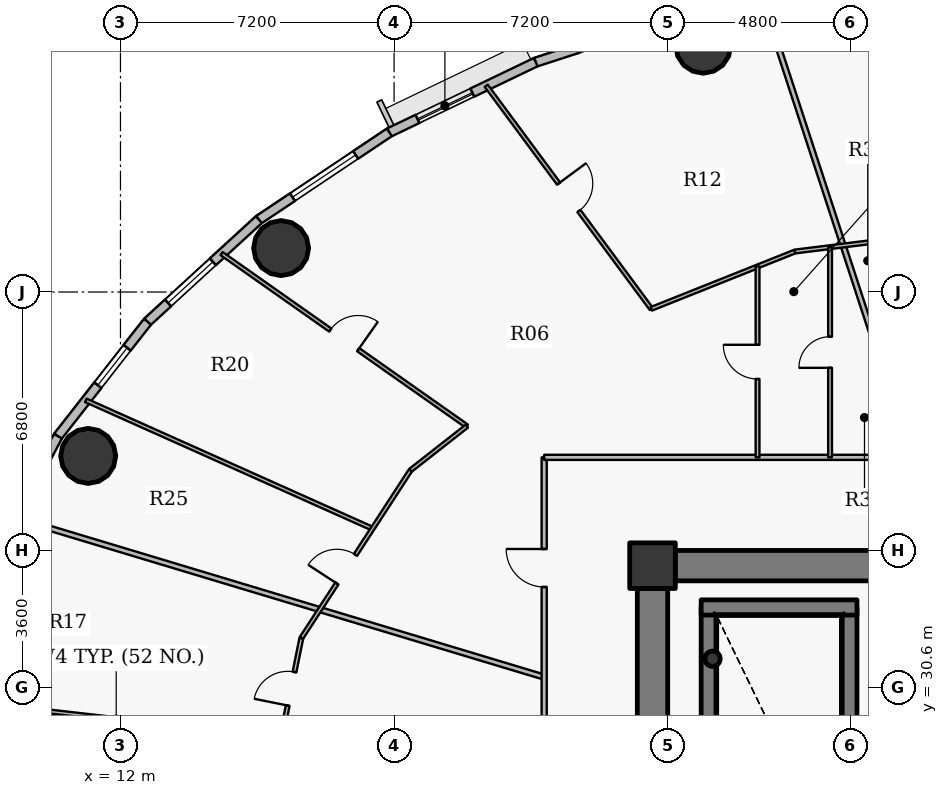
"""IFC4 building model, lengths in metres.
Left out: names, types, materials, properties, quantities, classifications, styles, units other than length and angle.
Written with IfcOpenShell. Run it as: python <this file> out.ifc"""

import sys

from ifc_helpers import new_model, si_unit, direction, frame, frame_2d, origin, origin_2d, place, context, subcontext, project, spatial, rectangle, hollow_circle, extrude, source, transform, mapped, element, fill, save


model = new_model("IFC4")
c1 = context("Model", 3, precision=1e-05, world=origin(), true_north=direction((0.0, 1.0)))
c2 = subcontext(c1, "Body", "Model", "MODEL_VIEW")
j1 = project(units=[si_unit("LENGTHUNIT", "METRE"), si_unit("PLANEANGLEUNIT", "RADIAN")], contexts=[c1])
p1 = place(None, origin())
s1 = spatial("IfcSite", under=j1, at=p1, CompositionType="ELEMENT")
p2 = place(p1, origin())
s2 = spatial("IfcBuilding", under=s1, at=p2, CompositionType="ELEMENT")
p3 = place(p2, frame((0.0, 0.0, 108.45)))
s3 = spatial("IfcBuildingStorey", under=s2, at=p3, CompositionType="ELEMENT", Elevation=108.45)
p4 = place(p3, frame((26.0, 33.8, 0.0), z_axis=(0.0, 0.0, 1.0), x_axis=(1.0, 0.0, 0.0)))
e1 = element("IfcColumn", 1, at=p4, inside=s3, PredefinedType="COLUMN", context=c2, shape_type="SweptSolid", body=[
    extrude(rectangle(XDim=1.2, YDim=1.2, at=origin_2d()), origin(), (0.0, 0.0, 1.0), 3.75),
])
p5 = place(p3, frame((27.48, 24.1, 0.0), z_axis=(0.0, 0.0, 1.0), x_axis=(0.0, 1.0, 0.0)))
e2 = element("IfcWall", 2, at=p5, inside=s3, PredefinedType="SHEAR", context=c2, shape_type="SweptSolid", body=[
    extrude(rectangle(XDim=8.6, YDim=0.4, at=frame_2d((4.3, 0.0))), origin(), (0.0, 0.0, 1.0), 3.75),
])
p6 = place(p3, frame((31.18, 27.8, 0.0), z_axis=(0.0, 0.0, 1.0), x_axis=(0.0, 1.0, 0.0)))
e3 = element("IfcWall", 3, at=p6, inside=s3, PredefinedType="SHEAR", context=c2, shape_type="SweptSolid", body=[
    extrude(rectangle(XDim=4.9, YDim=0.4, at=frame_2d((2.45, 0.0))), origin(), (0.0, 0.0, 1.0), 3.75),
])
p7 = place(p3, frame((27.28, 32.7, 0.0), z_axis=(0.0, 0.0, 1.0), x_axis=(1.0, 0.0, 0.0)))
e4 = element("IfcWall", 4, at=p7, inside=s3, PredefinedType="SHEAR", context=c2, shape_type="SweptSolid", body=[
    extrude(rectangle(XDim=4.1, YDim=0.4, at=frame_2d((2.05, 0.0))), origin(), (0.0, 0.0, 1.0), 3.75),
])
p8 = place(p3, frame((27.58, 31.35, 0.0), z_axis=(0.0, 0.0, 1.0), x_axis=(1.0, 0.0, 0.0)))
e5 = element("IfcColumn", 5, at=p8, inside=s3, PredefinedType="COLUMN", context=c2, shape_type="SweptSolid", body=[
    extrude(hollow_circle(Radius=0.203, WallThickness=0.016, at=origin_2d()), origin(), (0.0, 0.0, 1.0), 3.75),
])
p9 = place(p3, frame((26.6, 33.8, 0.0), z_axis=(0.0, 0.0, 1.0), x_axis=(1.0, 0.0, 0.0)))
e6 = element("IfcWall", 6, at=p9, inside=s3, PredefinedType="SHEAR", context=c2, shape_type="SweptSolid", body=[
    extrude(rectangle(XDim=18.8, YDim=0.8, at=frame_2d((9.4, 0.0))), origin(), (0.0, 0.0, 1.0), 2.95),
])
p10 = place(p3, frame((26.0, 20.8, 0.0), z_axis=(0.0, 0.0, 1.0), x_axis=(0.0, 1.0, 0.0)))
e7 = element("IfcWall", 7, at=p10, inside=s3, PredefinedType="SHEAR", context=c2, shape_type="SweptSolid", body=[
    extrude(rectangle(XDim=12.4, YDim=0.8, at=frame_2d((6.2, 0.0))), origin(), (0.0, 0.0, 1.0), 2.95),
])
p11 = place(p10, frame((5.79, 0.0, 0.0)))
e8 = element("IfcOpeningElement", 8, at=p11, cuts=e7, PredefinedType="OPENING", context=c2, shape_type="SweptSolid", body=[
    extrude(rectangle(XDim=0.82, YDim=2.1, at=origin_2d()), frame((0.41, 0.41, 1.05), z_axis=(0.0, -1.0, 0.0), x_axis=(1.0, 0.0, 0.0)), (0.0, 0.0, 1.0), 0.82),
])
for number, where, z_axis, x_axis in (
    (9, (27.334, 47.481, 0.0), (0.0, 0.0, 1.0), (1.0, 0.0, 0.0)),
    (10, (16.227, 42.156, 0.0), (0.0, 0.0, 1.0), (1.0, 0.0, 0.0)),
    (11, (11.151, 36.688, 0.0), (0.0, 0.0, 1.0), (1.0, 0.0, 0.0)),
):
    element("IfcColumn", number, at=place(p3, frame(where, z_axis=z_axis, x_axis=x_axis)), inside=s3, PredefinedType="COLUMN", context=c2, shape_type="SweptSolid", body=[
        extrude(hollow_circle(Radius=0.725, WallThickness=0.042, at=origin_2d()), origin(), (0.0, 0.0, 1.0), 3.75),
    ])
p12 = place(p3, frame((22.926, 47.047, 0.0), z_axis=(0.0, 0.0, 1.0), x_axis=(0.951211346073, 0.308540070495, 0.0)))
e12 = element("IfcWall", 12, at=p12, inside=s3, PredefinedType="SOLIDWALL", context=c2, shape_type="SweptSolid", body=[
    extrude(rectangle(XDim=4.388, YDim=0.24, at=frame_2d((2.194, 0.0))), origin(), (0.0, 0.0, 1.0), 3.5),
])
p13 = place(p12, frame((1.194, 0.0, 0.9)))
e13 = element("IfcOpeningElement", 13, at=p13, cuts=e12, PredefinedType="OPENING", context=c2, shape_type="SweptSolid", body=[
    extrude(rectangle(XDim=2.0, YDim=1.75, at=origin_2d()), frame((1.0, 0.13, 0.875), z_axis=(0.0, -1.0, 0.0), x_axis=(1.0, 0.0, 0.0)), (0.0, 0.0, 1.0), 0.26),
])
p14 = place(p3, frame((19.075, 45.199, 0.0), z_axis=(0.0, 0.0, 1.0), x_axis=(0.901589935876, 0.432591709962, 0.0)))
e14 = element("IfcWall", 14, at=p14, inside=s3, PredefinedType="SOLIDWALL", context=c2, shape_type="SweptSolid", body=[
    extrude(rectangle(XDim=4.272, YDim=0.24, at=frame_2d((2.136, 0.0))), origin(), (0.0, 0.0, 1.0), 3.5),
])
p15 = place(p14, frame((0.822, 0.0, 0.9)))
e15 = element("IfcOpeningElement", 15, at=p15, cuts=e14, PredefinedType="OPENING", context=c2, shape_type="SweptSolid", body=[
    extrude(rectangle(XDim=1.6, YDim=1.75, at=origin_2d()), frame((0.8, 0.13, 0.875), z_axis=(0.0, -1.0, 0.0), x_axis=(1.0, 0.0, 0.0)), (0.0, 0.0, 1.0), 0.26),
])
p16 = place(p3, frame((15.642, 42.903, 0.0), z_axis=(0.0, 0.0, 1.0), x_axis=(0.831221811447, 0.555940914284, 0.0)))
e16 = element("IfcWall", 16, at=p16, inside=s3, PredefinedType="SOLIDWALL", context=c2, shape_type="SweptSolid", body=[
    extrude(rectangle(XDim=4.13, YDim=0.24, at=frame_2d((2.065, 0.0))), origin(), (0.0, 0.0, 1.0), 3.5),
])
p17 = place(p16, frame((1.065, 0.0, 0.9)))
e17 = element("IfcOpeningElement", 17, at=p17, cuts=e16, PredefinedType="OPENING", context=c2, shape_type="SweptSolid", body=[
    extrude(rectangle(XDim=2.0, YDim=1.75, at=origin_2d()), frame((1.0, 0.13, 0.875), z_axis=(0.0, -1.0, 0.0), x_axis=(1.0, 0.0, 0.0)), (0.0, 0.0, 1.0), 0.26),
])
p18 = place(p3, frame((12.711, 40.217, 0.0), z_axis=(0.0, 0.0, 1.0), x_axis=(0.737113356241, 0.675769117414, 0.0)))
e18 = element("IfcWall", 18, at=p18, inside=s3, PredefinedType="SOLIDWALL", context=c2, shape_type="SweptSolid", body=[
    extrude(rectangle(XDim=3.976, YDim=0.24, at=frame_2d((1.988, 0.0))), origin(), (0.0, 0.0, 1.0), 3.5),
])
p19 = place(p18, frame((0.734, 0.0, 0.9)))
e19 = element("IfcOpeningElement", 19, at=p19, cuts=e18, PredefinedType="OPENING", context=c2, shape_type="SweptSolid", body=[
    extrude(rectangle(XDim=1.6, YDim=1.75, at=origin_2d()), frame((0.8, 0.13, 0.875), z_axis=(0.0, -1.0, 0.0), x_axis=(1.0, 0.0, 0.0)), (0.0, 0.0, 1.0), 0.26),
])
p20 = place(p3, frame((10.355, 37.206, 0.0), z_axis=(0.0, 0.0, 1.0), x_axis=(0.616272103517, 0.787533297345, 0.0)))
e20 = element("IfcWall", 20, at=p20, inside=s3, PredefinedType="SOLIDWALL", context=c2, shape_type="SweptSolid", body=[
    extrude(rectangle(XDim=3.823, YDim=0.24, at=frame_2d((1.912, 0.0))), origin(), (0.0, 0.0, 1.0), 3.5),
])
p21 = place(p20, frame((1.705, 0.0, 0.9)))
e21 = element("IfcOpeningElement", 21, at=p21, cuts=e20, PredefinedType="OPENING", context=c2, shape_type="SweptSolid", body=[
    extrude(rectangle(XDim=1.25, YDim=1.65, at=origin_2d()), frame((0.625, 0.13, 0.825), z_axis=(0.0, -1.0, 0.0), x_axis=(1.0, 0.0, 0.0)), (0.0, 0.0, 1.0), 0.26),
])
p22 = place(p3, frame((8.63, 33.945, 0.0), z_axis=(0.0, 0.0, 1.0), x_axis=(0.467614004126, 0.883932770716, 0.0)))
e22 = element("IfcWall", 22, at=p22, inside=s3, PredefinedType="SOLIDWALL", context=c2, shape_type="SweptSolid", body=[
    extrude(rectangle(XDim=3.689, YDim=0.24, at=frame_2d((1.844, 0.0))), origin(), (0.0, 0.0, 1.0), 3.5),
])
p23 = place(p3, frame((7.548, 30.259, 0.0), z_axis=(0.0, 0.0, 1.0), x_axis=(0.993502465776, -0.11381059044, 0.0)))
e23 = element("IfcWall", 23, at=p23, inside=s3, PredefinedType="PARTITIONING", context=c2, shape_type="SweptSolid", body=[
    extrude(rectangle(XDim=8.737, YDim=0.1, at=frame_2d((4.369, 0.0))), origin(), (0.0, 0.0, 1.0), 2.935),
])
p24 = place(p3, frame((9.215, 35.062, 0.0), z_axis=(0.0, 0.0, 1.0), x_axis=(0.957569176287, -0.288203526393, 0.0)))
e24 = element("IfcWall", 24, at=p24, inside=s3, PredefinedType="PARTITIONING", context=c2, shape_type="SweptSolid", body=[
    extrude(rectangle(XDim=14.552, YDim=0.135, at=frame_2d((7.276, 0.0))), origin(), (0.0, 0.0, 1.0), 2.935),
])
p25 = place(p3, frame((11.087, 38.15, 0.0), z_axis=(0.0, 0.0, 1.0), x_axis=(0.912756243594, -0.408504638627, 0.0)))
e25 = element("IfcWall", 25, at=p25, inside=s3, PredefinedType="PARTITIONING", context=c2, shape_type="SweptSolid", body=[
    extrude(rectangle(XDim=8.267, YDim=0.1, at=frame_2d((4.133, 0.0))), origin(), (0.0, 0.0, 1.0), 2.935),
])
p26 = place(p3, frame((14.661, 42.011, 0.0), z_axis=(0.0, 0.0, 1.0), x_axis=(0.817899711196, -0.575360810645, 0.0)))
e26 = element("IfcWall", 26, at=p26, inside=s3, PredefinedType="PARTITIONING", context=c2, shape_type="SweptSolid", body=[
    extrude(rectangle(XDim=7.891, YDim=0.1, at=frame_2d((3.945, 0.0))), origin(), (0.0, 0.0, 1.0), 2.935),
])
p27 = place(p26, frame((3.495, 0.0, 0.0)))
e27 = element("IfcOpeningElement", 27, at=p27, cuts=e26, PredefinedType="OPENING", context=c2, shape_type="SweptSolid", body=[
    extrude(rectangle(XDim=0.9, YDim=2.1, at=origin_2d()), frame((0.45, 0.06, 1.05), z_axis=(0.0, -1.0, 0.0), x_axis=(1.0, 0.0, 0.0)), (0.0, 0.0, 1.0), 0.12),
])
p28 = place(p3, frame((15.77, 27.0, 0.0), z_axis=(0.0, 0.0, 1.0), x_axis=(0.19822142127, 0.980157267049, 0.0)))
e28 = element("IfcWall", 28, at=p28, inside=s3, PredefinedType="PARTITIONING", context=c2, shape_type="SweptSolid", body=[
    extrude(rectangle(XDim=4.994, YDim=0.1, at=frame_2d((2.497, 0.0))), origin(), (0.0, 0.0, 1.0), 2.935),
])
p29 = place(p28, frame((3.183, 0.0, 0.0)))
e29 = element("IfcOpeningElement", 29, at=p29, cuts=e28, PredefinedType="OPENING", context=c2, shape_type="SweptSolid", body=[
    extrude(rectangle(XDim=0.9, YDim=2.1, at=origin_2d()), frame((0.45, 0.06, 1.05), z_axis=(0.0, -1.0, 0.0), x_axis=(1.0, 0.0, 0.0)), (0.0, 0.0, 1.0), 0.12),
])
p30 = place(p28, frame((0.725, 0.0, 0.0)))
e30 = element("IfcOpeningElement", 30, at=p30, cuts=e28, PredefinedType="OPENING", context=c2, shape_type="SweptSolid", body=[
    extrude(rectangle(XDim=0.9, YDim=2.1, at=origin_2d()), frame((0.45, 0.06, 1.05), z_axis=(0.0, -1.0, 0.0), x_axis=(1.0, 0.0, 0.0)), (0.0, 0.0, 1.0), 0.12),
])
p31 = place(p3, frame((16.76, 31.895, 0.0), z_axis=(0.0, 0.0, 1.0), x_axis=(0.545405249109, 0.838172484781, 0.0)))
e31 = element("IfcWall", 31, at=p31, inside=s3, PredefinedType="PARTITIONING", context=c2, shape_type="SweptSolid", body=[
    extrude(rectangle(XDim=5.269, YDim=0.1, at=frame_2d((2.634, 0.0))), origin(), (0.0, 0.0, 1.0), 2.935),
])
p32 = place(p31, frame((1.713, 0.0, 0.0)))
e32 = element("IfcOpeningElement", 32, at=p32, cuts=e31, PredefinedType="OPENING", context=c2, shape_type="SweptSolid", body=[
    extrude(rectangle(XDim=0.9, YDim=2.1, at=origin_2d()), frame((0.45, 0.06, 1.05), z_axis=(0.0, -1.0, 0.0), x_axis=(1.0, 0.0, 0.0)), (0.0, 0.0, 1.0), 0.12),
])
p33 = place(p3, frame((19.634, 36.311, 0.0), z_axis=(0.0, 0.0, 1.0), x_axis=(0.787307829703, 0.616560119768, 0.0)))
e33 = element("IfcWall", 33, at=p33, inside=s3, PredefinedType="PARTITIONING", context=c2, shape_type="SweptSolid", body=[
    extrude(rectangle(XDim=1.882, YDim=0.1, at=frame_2d((0.941, 0.0))), origin(), (0.0, 0.0, 1.0), 3.5),
])
p34 = place(p3, frame((21.624, 46.428, 0.0), z_axis=(0.0, 0.0, 1.0), x_axis=(0.594804555611, -0.803870350631, 0.0)))
e34 = element("IfcWall", 34, at=p34, inside=s3, PredefinedType="PARTITIONING", context=c2, shape_type="SweptSolid", body=[
    extrude(rectangle(XDim=7.303, YDim=0.1, at=frame_2d((3.652, 0.0))), origin(), (0.0, 0.0, 1.0), 2.935),
])
p35 = place(p34, frame((3.202, 0.0, 0.0)))
e35 = element("IfcOpeningElement", 35, at=p35, cuts=e34, PredefinedType="OPENING", context=c2, shape_type="SweptSolid", body=[
    extrude(rectangle(XDim=0.9, YDim=2.1, at=origin_2d()), frame((0.45, 0.06, 1.05), z_axis=(0.0, -1.0, 0.0), x_axis=(1.0, 0.0, 0.0)), (0.0, 0.0, 1.0), 0.12),
])
p36 = place(p3, frame((23.15, 17.35, 0.0), z_axis=(0.0, 0.0, 1.0), x_axis=(0.0, 1.0, 0.0)))
e36 = element("IfcWall", 36, at=p36, inside=s3, PredefinedType="PARTITIONING", context=c2, shape_type="SweptSolid", body=[
    extrude(rectangle(XDim=19.3, YDim=0.135, at=frame_2d((9.65, 0.0))), origin(), (0.0, 0.0, 1.0), 2.935),
])
p37 = place(p36, frame((15.889, 0.0, 0.0)))
e37 = element("IfcOpeningElement", 37, at=p37, cuts=e36, PredefinedType="OPENING", context=c2, shape_type="SweptSolid", body=[
    extrude(rectangle(XDim=1.0, YDim=2.15, at=origin_2d()), frame((0.5, 0.078, 1.075), z_axis=(0.0, -1.0, 0.0), x_axis=(1.0, 0.0, 0.0)), (0.0, 0.0, 1.0), 0.155),
])
p38 = place(p36, frame((6.279, 0.0, 0.0)))
e38 = element("IfcOpeningElement", 38, at=p38, cuts=e36, PredefinedType="OPENING", context=c2, shape_type="SweptSolid", body=[
    extrude(rectangle(XDim=1.0, YDim=2.15, at=origin_2d()), frame((0.5, 0.078, 1.075), z_axis=(0.0, -1.0, 0.0), x_axis=(1.0, 0.0, 0.0)), (0.0, 0.0, 1.0), 0.155),
])
p39 = place(p3, frame((23.15, 36.65, 0.0), z_axis=(0.0, 0.0, 1.0), x_axis=(1.0, 0.0, 0.0)))
e39 = element("IfcWall", 39, at=p39, inside=s3, PredefinedType="PARTITIONING", context=c2, shape_type="SweptSolid", body=[
    extrude(rectangle(XDim=10.373, YDim=0.135, at=frame_2d((5.187, 0.0))), origin(), (0.0, 0.0, 1.0), 2.935),
])
p40 = place(p3, frame((25.968, 40.557, 0.0), z_axis=(0.0, 0.0, 1.0), x_axis=(0.928807252466, 0.37056320347, 0.0)))
e40 = element("IfcWall", 40, at=p40, inside=s3, PredefinedType="PARTITIONING", context=c2, shape_type="SweptSolid", body=[
    extrude(rectangle(XDim=4.07, YDim=0.1, at=frame_2d((2.035, 0.0))), origin(), (0.0, 0.0, 1.0), 2.935),
])
p41 = place(p3, frame((28.764, 36.65, 0.0), z_axis=(0.0, 0.0, 1.0), x_axis=(0.0, 1.0, 0.0)))
e41 = element("IfcWall", 41, at=p41, inside=s3, PredefinedType="PARTITIONING", context=c2, shape_type="SweptSolid", body=[
    extrude(rectangle(XDim=5.023, YDim=0.1, at=frame_2d((2.511, 0.0))), origin(), (0.0, 0.0, 1.0), 3.5),
])
p42 = place(p41, frame((2.062, 0.0, 0.0)))
e42 = element("IfcOpeningElement", 42, at=p42, cuts=e41, PredefinedType="OPENING", context=c2, shape_type="SweptSolid", body=[
    extrude(rectangle(XDim=0.9, YDim=2.1, at=origin_2d()), frame((0.45, 0.06, 1.05), z_axis=(0.0, -1.0, 0.0), x_axis=(1.0, 0.0, 0.0)), (0.0, 0.0, 1.0), 0.12),
])
p43 = place(p3, frame((28.883, 48.741, 0.0), z_axis=(0.0, 0.0, 1.0), x_axis=(0.311090320612, -0.95038035145, 0.0)))
e43 = element("IfcWall", 43, at=p43, inside=s3, PredefinedType="PARTITIONING", context=c2, shape_type="SweptSolid", body=[
    extrude(rectangle(XDim=12.671, YDim=0.135, at=frame_2d((6.335, 0.0))), origin(), (0.0, 0.0, 1.0), 2.935),
])
p44 = place(p3, frame((29.749, 42.066, 0.0), z_axis=(0.0, 0.0, 1.0), x_axis=(0.992395485088, 0.123090215599, 0.0)))
e44 = element("IfcWall", 44, at=p44, inside=s3, PredefinedType="PARTITIONING", context=c2, shape_type="SweptSolid", body=[
    extrude(rectangle(XDim=6.299, YDim=0.1, at=frame_2d((3.15, 0.0))), origin(), (0.0, 0.0, 1.0), 2.935),
])
p45 = place(p3, frame((30.673, 36.65, 0.0), z_axis=(0.0, 0.0, 1.0), x_axis=(0.0, 1.0, 0.0)))
e45 = element("IfcWall", 45, at=p45, inside=s3, PredefinedType="PARTITIONING", context=c2, shape_type="SweptSolid", body=[
    extrude(rectangle(XDim=5.53, YDim=0.1, at=frame_2d((2.765, 0.0))), origin(), (0.0, 0.0, 1.0), 2.935),
])
p46 = place(p45, frame((2.355, 0.0, 0.0)))
e46 = element("IfcOpeningElement", 46, at=p46, cuts=e45, PredefinedType="OPENING", context=c2, shape_type="SweptSolid", body=[
    extrude(rectangle(XDim=0.82, YDim=2.1, at=origin_2d()), frame((0.41, 0.06, 1.05), z_axis=(0.0, -1.0, 0.0), x_axis=(1.0, 0.0, 0.0)), (0.0, 0.0, 1.0), 0.12),
])
p47 = place(p3, frame((26.59, 34.2, 0.0), z_axis=(0.0, 0.0, 1.0), x_axis=(-1.0, 0.0, 0.0)))
e47 = element("IfcWall", 47, at=p47, inside=s3, PredefinedType="PARTITIONING", context=c2, shape_type="SweptSolid", body=[
    extrude(rectangle(XDim=0.99, YDim=0.135, at=frame_2d((0.495, 0.0))), origin(), (0.0, 0.0, 1.0), 2.935),
])
p48 = place(p3, frame((25.6, 33.893, 0.0), z_axis=(0.0, 0.0, 1.0), x_axis=(0.0, -1.0, 0.0)))
e48 = element("IfcWall", 48, at=p48, inside=s3, PredefinedType="PARTITIONING", context=c2, shape_type="SweptSolid", body=[
    extrude(rectangle(XDim=0.683, YDim=0.135, at=frame_2d((0.341, 0.0))), origin(), (0.0, 0.0, 1.0), 3.5),
])
m1 = source(origin(), c2, "Body", "SweptSolid", [
    extrude(rectangle(XDim=1.6, YDim=1.75, at=origin_2d()), frame((0.8, 0.03, 0.875), z_axis=(0.0, -1.0, 0.0), x_axis=(1.0, 0.0, 0.0)), (0.0, 0.0, 1.0), 0.06),
])
p49 = place(p15, origin())
e49 = element("IfcWindow", 49, at=p49, inside=s3, PartitioningType="DOUBLE_PANEL_VERTICAL", PredefinedType="WINDOW", context=c2, shape_type="MappedRepresentation", body=[
    mapped(m1, transform((0.0, 0.0, 0.0), x_axis=(1.0, 0.0, 0.0), y_axis=(0.0, 1.0, 0.0), z_axis=(0.0, 0.0, 1.0), scale=1.0)),
])
fill(e15, e49)
m2 = source(origin(), c2, "Body", "SweptSolid", [
    extrude(rectangle(XDim=2.0, YDim=1.75, at=origin_2d()), frame((1.0, 0.03, 0.875), z_axis=(0.0, -1.0, 0.0), x_axis=(1.0, 0.0, 0.0)), (0.0, 0.0, 1.0), 0.06),
])
p50 = place(p17, origin())
e50 = element("IfcWindow", 50, at=p50, inside=s3, PartitioningType="DOUBLE_PANEL_VERTICAL", PredefinedType="WINDOW", context=c2, shape_type="MappedRepresentation", body=[
    mapped(m2, transform((0.0, 0.0, 0.0), x_axis=(1.0, 0.0, 0.0), y_axis=(0.0, 1.0, 0.0), z_axis=(0.0, 0.0, 1.0), scale=1.0)),
])
fill(e17, e50)
p51 = place(p19, origin())
e51 = element("IfcWindow", 51, at=p51, inside=s3, PartitioningType="DOUBLE_PANEL_VERTICAL", PredefinedType="WINDOW", context=c2, shape_type="MappedRepresentation", body=[
    mapped(m1, transform((0.0, 0.0, 0.0), x_axis=(1.0, 0.0, 0.0), y_axis=(0.0, 1.0, 0.0), z_axis=(0.0, 0.0, 1.0), scale=1.0)),
])
fill(e19, e51)
m3 = source(origin(), c2, "Body", "SweptSolid", [
    extrude(rectangle(XDim=1.25, YDim=1.65, at=origin_2d()), frame((0.625, 0.03, 0.825), z_axis=(0.0, -1.0, 0.0), x_axis=(1.0, 0.0, 0.0)), (0.0, 0.0, 1.0), 0.06),
])
p52 = place(p21, origin())
e52 = element("IfcWindow", 52, at=p52, inside=s3, PartitioningType="SINGLE_PANEL", PredefinedType="WINDOW", context=c2, shape_type="MappedRepresentation", body=[
    mapped(m3, transform((0.0, 0.0, 0.0), x_axis=(1.0, 0.0, 0.0), y_axis=(0.0, 1.0, 0.0), z_axis=(0.0, 0.0, 1.0), scale=1.0)),
])
fill(e21, e52)
m4 = source(origin(), c2, "Body", "SweptSolid", [
    extrude(rectangle(XDim=1.0, YDim=2.15, at=origin_2d()), frame((0.5, 0.025, 1.075), z_axis=(0.0, -1.0, 0.0), x_axis=(1.0, 0.0, 0.0)), (0.0, 0.0, 1.0), 0.05),
])
p53 = place(p37, origin())
e53 = element("IfcDoor", 53, at=p53, inside=s3, OperationType="SINGLE_SWING_RIGHT", PredefinedType="DOOR", context=c2, shape_type="MappedRepresentation", body=[
    mapped(m4, transform((0.0, 0.0, 0.0), x_axis=(1.0, 0.0, 0.0), y_axis=(0.0, 1.0, 0.0), z_axis=(0.0, 0.0, 1.0), scale=1.0)),
])
fill(e37, e53)
m5 = source(origin(), c2, "Body", "SweptSolid", [
    extrude(rectangle(XDim=0.9, YDim=2.1, at=origin_2d()), frame((0.45, 0.025, 1.05), z_axis=(0.0, -1.0, 0.0), x_axis=(1.0, 0.0, 0.0)), (0.0, 0.0, 1.0), 0.05),
])
p54 = place(p35, origin())
e54 = element("IfcDoor", 54, at=p54, inside=s3, OperationType="SINGLE_SWING_LEFT", PredefinedType="DOOR", context=c2, shape_type="MappedRepresentation", body=[
    mapped(m5, transform((0.0, 0.0, 0.0), x_axis=(1.0, 0.0, 0.0), y_axis=(0.0, 1.0, 0.0), z_axis=(0.0, 0.0, 1.0), scale=1.0)),
])
fill(e35, e54)
p55 = place(p27, origin())
e55 = element("IfcDoor", 55, at=p55, inside=s3, OperationType="SINGLE_SWING_RIGHT", PredefinedType="DOOR", context=c2, shape_type="MappedRepresentation", body=[
    mapped(m5, transform((0.0, 0.0, 0.0), x_axis=(1.0, 0.0, 0.0), y_axis=(0.0, 1.0, 0.0), z_axis=(0.0, 0.0, 1.0), scale=1.0)),
])
fill(e27, e55)
p56 = place(p32, origin())
e56 = element("IfcDoor", 56, at=p56, inside=s3, OperationType="SINGLE_SWING_LEFT", PredefinedType="DOOR", context=c2, shape_type="MappedRepresentation", body=[
    mapped(m5, transform((0.0, 0.0, 0.0), x_axis=(1.0, 0.0, 0.0), y_axis=(0.0, 1.0, 0.0), z_axis=(0.0, 0.0, 1.0), scale=1.0)),
])
fill(e32, e56)
p57 = place(p42, origin())
e57 = element("IfcDoor", 57, at=p57, inside=s3, OperationType="SINGLE_SWING_RIGHT", PredefinedType="DOOR", context=c2, shape_type="MappedRepresentation", body=[
    mapped(m5, transform((0.0, 0.0, 0.0), x_axis=(1.0, 0.0, 0.0), y_axis=(0.0, 1.0, 0.0), z_axis=(0.0, 0.0, 1.0), scale=1.0)),
])
fill(e42, e57)
m6 = source(origin(), c2, "Body", "SweptSolid", [
    extrude(rectangle(XDim=0.82, YDim=2.1, at=origin_2d()), frame((0.41, 0.025, 1.05), z_axis=(0.0, -1.0, 0.0), x_axis=(1.0, 0.0, 0.0)), (0.0, 0.0, 1.0), 0.05),
])
p58 = place(p46, origin())
e58 = element("IfcDoor", 58, at=p58, inside=s3, OperationType="SINGLE_SWING_LEFT", PredefinedType="DOOR", context=c2, shape_type="MappedRepresentation", body=[
    mapped(m6, transform((0.0, 0.0, 0.0), x_axis=(1.0, 0.0, 0.0), y_axis=(0.0, 1.0, 0.0), z_axis=(0.0, 0.0, 1.0), scale=1.0)),
])
fill(e46, e58)
p59 = place(p29, origin())
e59 = element("IfcDoor", 59, at=p59, inside=s3, OperationType="SINGLE_SWING_LEFT", PredefinedType="DOOR", context=c2, shape_type="MappedRepresentation", body=[
    mapped(m5, transform((0.0, 0.0, 0.0), x_axis=(1.0, 0.0, 0.0), y_axis=(0.0, 1.0, 0.0), z_axis=(0.0, 0.0, 1.0), scale=1.0)),
])
fill(e29, e59)
save(model, sys.argv[1])
